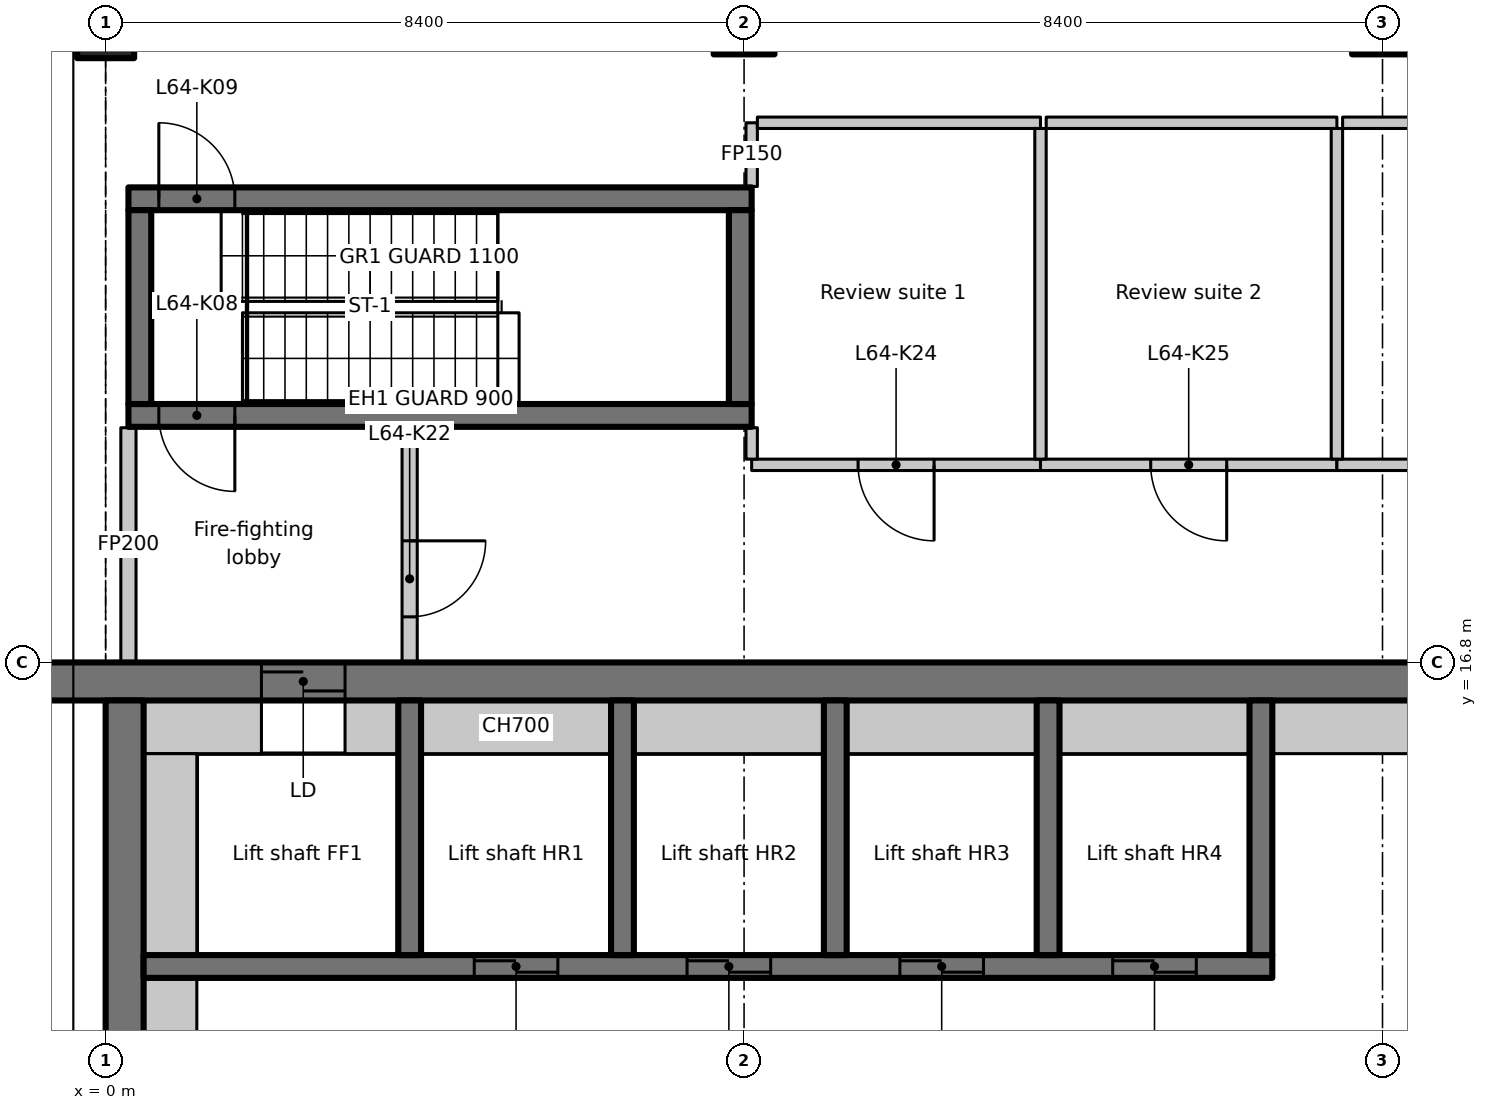
"""IFC4 building model, lengths in metres.
Left out: names, types, materials, properties, quantities, classifications, styles, units other than length and angle.
Written with IfcOpenShell. Run it as: python <this file> out.ifc"""

import sys

from ifc_helpers import new_model, si_unit, direction, frame, frame_2d, origin, origin_2d, place, context, subcontext, project, spatial, rectangle, extrude, element, fill, save


model = new_model("IFC4")
c1 = context("Model", 3, precision=1e-05, world=origin(), true_north=direction((0.0, 1.0)))
c2 = subcontext(c1, "Body", "Model", "MODEL_VIEW")
j1 = project(units=[si_unit("LENGTHUNIT", "METRE"), si_unit("PLANEANGLEUNIT", "RADIAN")], contexts=[c1])
p1 = place(None, origin())
s1 = spatial("IfcSite", under=j1, at=p1, CompositionType="ELEMENT")
p2 = place(p1, origin())
s2 = spatial("IfcBuilding", under=s1, at=p2, CompositionType="ELEMENT")
p3 = place(p2, frame((0.0, 0.0, 251.7)))
s3 = spatial("IfcBuildingStorey", under=s2, at=p3, CompositionType="ELEMENT", Elevation=251.7)
p4 = place(p3, frame((0.0, 25.2, 0.0), z_axis=(0.0, 0.0, 1.0), x_axis=(1.0, 0.0, 0.0)))
e1 = element("IfcColumn", 1, at=p4, inside=s3, PredefinedType="COLUMN", context=c2, shape_type="SweptSolid", body=[
    extrude(rectangle(XDim=0.75, YDim=0.9, at=origin_2d()), origin(), (0.0, 0.0, 1.0), 4.05),
])
for number, where, z_axis, x_axis in (
    (2, (8.4, 25.2, 0.0), (0.0, 0.0, 1.0), (1.0, 0.0, 0.0)),
    (3, (16.8, 25.2, 0.0), (0.0, 0.0, 1.0), (1.0, 0.0, 0.0)),
):
    element("IfcColumn", number, at=place(p3, frame(where, z_axis=z_axis, x_axis=x_axis)), inside=s3, PredefinedType="COLUMN", context=c2, shape_type="SweptSolid", body=[
        extrude(rectangle(XDim=0.8, YDim=0.8, at=origin_2d()), origin(), (0.0, 0.0, 1.0), 4.05),
    ])
p5 = place(p3, frame((-1.1, 16.55, 0.0), z_axis=(0.0, 0.0, 1.0), x_axis=(1.0, 0.0, 0.0)))
e4 = element("IfcWall", 4, at=p5, inside=s3, PredefinedType="SHEAR", context=c2, shape_type="SweptSolid", body=[
    extrude(rectangle(XDim=22.1, YDim=0.5, at=frame_2d((11.05, 0.0))), origin(), (0.0, 0.0, 1.0), 4.05),
])
p6 = place(p5, frame((3.15, 0.0, 0.0)))
e5 = element("IfcOpeningElement", 5, at=p6, cuts=e4, PredefinedType="OPENING", context=c2, shape_type="SweptSolid", body=[
    extrude(rectangle(XDim=1.1, YDim=2.3, at=frame_2d((0.55, 1.15))), frame((0.0, 0.26, 0.0), z_axis=(0.0, -1.0, 0.0), x_axis=(1.0, 0.0, 0.0)), (0.0, 0.0, 1.0), 0.52),
])
p7 = place(p3, frame((0.25, 7.436, 0.0), z_axis=(0.0, 0.0, 1.0), x_axis=(0.0, 1.0, 0.0)))
e6 = element("IfcWall", 6, at=p7, inside=s3, PredefinedType="SHEAR", context=c2, shape_type="SweptSolid", body=[
    extrude(rectangle(XDim=8.864, YDim=0.5, at=frame_2d((4.432, 0.0))), origin(), (0.0, 0.0, 1.0), 4.05),
])
p8 = place(p3, frame((0.5, 15.95, 0.0), z_axis=(0.0, 0.0, 1.0), x_axis=(1.0, 0.0, 0.0)))
e7 = element("IfcWall", 7, at=p8, inside=s3, PredefinedType="PARTITIONING", context=c2, shape_type="SweptSolid", body=[
    extrude(rectangle(XDim=1.55, YDim=0.7, at=frame_2d((0.775, 0.0))), origin(), (0.0, 0.0, 1.0), 4.05),
])
p9 = place(p3, frame((0.5, 12.8, 0.0), z_axis=(0.0, 0.0, 1.0), x_axis=(1.0, 0.0, 0.0)))
e8 = element("IfcWall", 8, at=p9, inside=s3, PredefinedType="SHEAR", context=c2, shape_type="SweptSolid", body=[
    extrude(rectangle(XDim=14.85, YDim=0.3, at=frame_2d((7.425, 0.0))), origin(), (0.0, 0.0, 1.0), 4.05),
])
p10 = place(p9, frame((4.35, 0.0, 0.0)))
e9 = element("IfcOpeningElement", 9, at=p10, cuts=e8, PredefinedType="OPENING", context=c2, shape_type="SweptSolid", body=[
    extrude(rectangle(XDim=1.1, YDim=2.3, at=frame_2d((0.55, 1.15))), frame((0.0, 0.16, 0.0), z_axis=(0.0, -1.0, 0.0), x_axis=(1.0, 0.0, 0.0)), (0.0, 0.0, 1.0), 0.32),
])
p11 = place(p9, frame((7.15, 0.0, 0.0)))
e10 = element("IfcOpeningElement", 10, at=p11, cuts=e8, PredefinedType="OPENING", context=c2, shape_type="SweptSolid", body=[
    extrude(rectangle(XDim=1.1, YDim=2.3, at=frame_2d((0.55, 1.15))), frame((0.0, 0.16, 0.0), z_axis=(0.0, -1.0, 0.0), x_axis=(1.0, 0.0, 0.0)), (0.0, 0.0, 1.0), 0.32),
])
p12 = place(p9, frame((9.95, 0.0, 0.0)))
e11 = element("IfcOpeningElement", 11, at=p12, cuts=e8, PredefinedType="OPENING", context=c2, shape_type="SweptSolid", body=[
    extrude(rectangle(XDim=1.1, YDim=2.3, at=frame_2d((0.55, 1.15))), frame((0.0, 0.16, 0.0), z_axis=(0.0, -1.0, 0.0), x_axis=(1.0, 0.0, 0.0)), (0.0, 0.0, 1.0), 0.32),
])
p13 = place(p9, frame((12.75, 0.0, 0.0)))
e12 = element("IfcOpeningElement", 12, at=p13, cuts=e8, PredefinedType="OPENING", context=c2, shape_type="SweptSolid", body=[
    extrude(rectangle(XDim=1.1, YDim=2.3, at=frame_2d((0.55, 1.15))), frame((0.0, 0.16, 0.0), z_axis=(0.0, -1.0, 0.0), x_axis=(1.0, 0.0, 0.0)), (0.0, 0.0, 1.0), 0.32),
])
for number, where, z_axis, x_axis in (
    (13, (4.0, 12.95, 0.0), (0.0, 0.0, 1.0), (0.0, 1.0, 0.0)),
    (14, (6.8, 12.95, 0.0), (0.0, 0.0, 1.0), (0.0, 1.0, 0.0)),
    (15, (9.6, 12.95, 0.0), (0.0, 0.0, 1.0), (0.0, 1.0, 0.0)),
    (16, (12.4, 12.95, 0.0), (0.0, 0.0, 1.0), (0.0, 1.0, 0.0)),
    (17, (15.2, 12.95, 0.0), (0.0, 0.0, 1.0), (0.0, 1.0, 0.0)),
):
    element("IfcWall", number, at=place(p3, frame(where, z_axis=z_axis, x_axis=x_axis)), inside=s3, PredefinedType="SHEAR", context=c2, shape_type="SweptSolid", body=[
        extrude(rectangle(XDim=3.35, YDim=0.3, at=frame_2d((1.675, 0.0))), origin(), (0.0, 0.0, 1.0), 4.05),
    ])
p14 = place(p3, frame((8.5, 20.05, 0.0), z_axis=(0.0, 0.0, 1.0), x_axis=(-1.0, 0.0, 0.0)))
e18 = element("IfcWall", 18, at=p14, inside=s3, PredefinedType="SHEAR", context=c2, shape_type="SweptSolid", body=[
    extrude(rectangle(XDim=8.2, YDim=0.3, at=frame_2d((4.1, 0.0))), origin(), (0.0, 0.0, 1.0), 4.05),
])
p15 = place(p14, frame((6.8, 0.0, 0.0)))
e19 = element("IfcOpeningElement", 19, at=p15, cuts=e18, PredefinedType="OPENING", context=c2, shape_type="SweptSolid", body=[
    extrude(rectangle(XDim=1.0, YDim=2.1, at=frame_2d((0.5, 1.05))), frame((0.0, 0.16, 0.0), z_axis=(0.0, -1.0, 0.0), x_axis=(1.0, 0.0, 0.0)), (0.0, 0.0, 1.0), 0.32),
])
p16 = place(p3, frame((0.3, 22.9, 0.0), z_axis=(0.0, 0.0, 1.0), x_axis=(1.0, 0.0, 0.0)))
e20 = element("IfcWall", 20, at=p16, inside=s3, PredefinedType="SHEAR", context=c2, shape_type="SweptSolid", body=[
    extrude(rectangle(XDim=8.2, YDim=0.3, at=frame_2d((4.1, 0.0))), origin(), (0.0, 0.0, 1.0), 4.05),
])
p17 = place(p16, frame((0.4, 0.0, 0.0)))
e21 = element("IfcOpeningElement", 21, at=p17, cuts=e20, PredefinedType="OPENING", context=c2, shape_type="SweptSolid", body=[
    extrude(rectangle(XDim=1.0, YDim=2.1, at=frame_2d((0.5, 1.05))), frame((0.0, 0.16, 0.0), z_axis=(0.0, -1.0, 0.0), x_axis=(1.0, 0.0, 0.0)), (0.0, 0.0, 1.0), 0.32),
])
for number, where, z_axis, x_axis in (
    (22, (0.45, 20.2, 0.0), (0.0, 0.0, 1.0), (0.0, 1.0, 0.0)),
    (23, (8.35, 20.2, 0.0), (0.0, 0.0, 1.0), (0.0, 1.0, 0.0)),
):
    element("IfcWall", number, at=place(p3, frame(where, z_axis=z_axis, x_axis=x_axis)), inside=s3, PredefinedType="SHEAR", context=c2, shape_type="SweptSolid", body=[
        extrude(rectangle(XDim=2.55, YDim=0.3, at=frame_2d((1.275, 0.0))), origin(), (0.0, 0.0, 1.0), 4.05),
    ])
p18 = place(p3, frame((0.3, 16.812, 0.0), z_axis=(0.0, 0.0, 1.0), x_axis=(0.0, 1.0, 0.0)))
e24 = element("IfcWall", 24, at=p18, inside=s3, PredefinedType="PARTITIONING", context=c2, shape_type="SweptSolid", body=[
    extrude(rectangle(XDim=3.076, YDim=0.2, at=frame_2d((1.538, 0.0))), origin(), (0.0, 0.0, 1.0), 3.68),
])
p19 = place(p3, frame((4.0, 19.888, 0.0), z_axis=(0.0, 0.0, 1.0), x_axis=(0.0, -1.0, 0.0)))
e25 = element("IfcWall", 25, at=p19, inside=s3, PredefinedType="PARTITIONING", context=c2, shape_type="SweptSolid", body=[
    extrude(rectangle(XDim=3.076, YDim=0.2, at=frame_2d((1.538, 0.0))), origin(), (0.0, 0.0, 1.0), 4.05),
])
p20 = place(p19, frame((1.488, 0.0, 0.0)))
e26 = element("IfcOpeningElement", 26, at=p20, cuts=e25, PredefinedType="OPENING", context=c2, shape_type="SweptSolid", body=[
    extrude(rectangle(XDim=1.0, YDim=2.1, at=frame_2d((0.5, 1.05))), frame((0.0, 0.11, 0.0), z_axis=(0.0, -1.0, 0.0), x_axis=(1.0, 0.0, 0.0)), (0.0, 0.0, 1.0), 0.22),
])
p21 = place(p3, frame((12.3, 19.4, 0.0), z_axis=(0.0, 0.0, 1.0), x_axis=(-1.0, 0.0, 0.0)))
e27 = element("IfcWall", 27, at=p21, inside=s3, PredefinedType="PARTITIONING", context=c2, shape_type="SweptSolid", body=[
    extrude(rectangle(XDim=3.8, YDim=0.15, at=frame_2d((1.9, 0.0))), origin(), (0.0, 0.0, 1.0), 4.05),
])
p22 = place(p21, frame((1.4, 0.0, 0.0)))
e28 = element("IfcOpeningElement", 28, at=p22, cuts=e27, PredefinedType="OPENING", context=c2, shape_type="SweptSolid", body=[
    extrude(rectangle(XDim=1.0, YDim=2.1, at=frame_2d((0.5, 1.05))), frame((0.0, 0.085, 0.0), z_axis=(0.0, -1.0, 0.0), x_axis=(1.0, 0.0, 0.0)), (0.0, 0.0, 1.0), 0.17),
])
p23 = place(p3, frame((8.5, 19.475, 0.0), z_axis=(0.0, 0.0, 1.0), x_axis=(0.0, 1.0, 0.0)))
e29 = element("IfcWall", 29, at=p23, inside=s3, PredefinedType="PARTITIONING", context=c2, shape_type="SweptSolid", body=[
    extrude(rectangle(XDim=0.413, YDim=0.15, at=frame_2d((0.207, 0.0))), origin(), (0.0, 0.0, 1.0), 4.05),
])
p24 = place(p3, frame((8.5, 23.062, 0.0), z_axis=(0.0, 0.0, 1.0), x_axis=(0.0, 1.0, 0.0)))
e30 = element("IfcWall", 30, at=p24, inside=s3, PredefinedType="PARTITIONING", context=c2, shape_type="SweptSolid", body=[
    extrude(rectangle(XDim=0.838, YDim=0.15, at=frame_2d((0.419, 0.0))), origin(), (0.0, 0.0, 1.0), 4.05),
])
p25 = place(p3, frame((8.575, 23.9, 0.0), z_axis=(0.0, 0.0, 1.0), x_axis=(1.0, 0.0, 0.0)))
e31 = element("IfcWall", 31, at=p25, inside=s3, PredefinedType="PARTITIONING", context=c2, shape_type="SweptSolid", body=[
    extrude(rectangle(XDim=3.725, YDim=0.15, at=frame_2d((1.863, 0.0))), origin(), (0.0, 0.0, 1.0), 4.05),
])
p26 = place(p3, frame((16.2, 19.4, 0.0), z_axis=(0.0, 0.0, 1.0), x_axis=(-1.0, 0.0, 0.0)))
e32 = element("IfcWall", 32, at=p26, inside=s3, PredefinedType="PARTITIONING", context=c2, shape_type="SweptSolid", body=[
    extrude(rectangle(XDim=3.9, YDim=0.15, at=frame_2d((1.95, 0.0))), origin(), (0.0, 0.0, 1.0), 4.05),
])
p27 = place(p26, frame((1.45, 0.0, 0.0)))
e33 = element("IfcOpeningElement", 33, at=p27, cuts=e32, PredefinedType="OPENING", context=c2, shape_type="SweptSolid", body=[
    extrude(rectangle(XDim=1.0, YDim=2.1, at=frame_2d((0.5, 1.05))), frame((0.0, 0.085, 0.0), z_axis=(0.0, -1.0, 0.0), x_axis=(1.0, 0.0, 0.0)), (0.0, 0.0, 1.0), 0.17),
])
p28 = place(p3, frame((12.3, 23.825, 0.0), z_axis=(0.0, 0.0, 1.0), x_axis=(0.0, -1.0, 0.0)))
e34 = element("IfcWall", 34, at=p28, inside=s3, PredefinedType="PARTITIONING", context=c2, shape_type="SweptSolid", body=[
    extrude(rectangle(XDim=4.35, YDim=0.15, at=frame_2d((2.175, 0.0))), origin(), (0.0, 0.0, 1.0), 4.05),
])
p29 = place(p3, frame((12.375, 23.9, 0.0), z_axis=(0.0, 0.0, 1.0), x_axis=(1.0, 0.0, 0.0)))
e35 = element("IfcWall", 35, at=p29, inside=s3, PredefinedType="PARTITIONING", context=c2, shape_type="SweptSolid", body=[
    extrude(rectangle(XDim=3.825, YDim=0.15, at=frame_2d((1.913, 0.0))), origin(), (0.0, 0.0, 1.0), 4.05),
])
p30 = place(p3, frame((19.925, 19.4, 0.0), z_axis=(0.0, 0.0, 1.0), x_axis=(-1.0, 0.0, 0.0)))
e36 = element("IfcWall", 36, at=p30, inside=s3, PredefinedType="PARTITIONING", context=c2, shape_type="SweptSolid", body=[
    extrude(rectangle(XDim=3.725, YDim=0.15, at=frame_2d((1.863, 0.0))), origin(), (0.0, 0.0, 1.0), 4.05),
])
p31 = place(p30, frame((1.325, 0.0, 0.0)))
e37 = element("IfcOpeningElement", 37, at=p31, cuts=e36, PredefinedType="OPENING", context=c2, shape_type="SweptSolid", body=[
    extrude(rectangle(XDim=1.0, YDim=2.1, at=frame_2d((0.5, 1.05))), frame((0.0, 0.085, 0.0), z_axis=(0.0, -1.0, 0.0), x_axis=(1.0, 0.0, 0.0)), (0.0, 0.0, 1.0), 0.17),
])
p32 = place(p3, frame((16.2, 23.825, 0.0), z_axis=(0.0, 0.0, 1.0), x_axis=(0.0, -1.0, 0.0)))
e38 = element("IfcWall", 38, at=p32, inside=s3, PredefinedType="PARTITIONING", context=c2, shape_type="SweptSolid", body=[
    extrude(rectangle(XDim=4.35, YDim=0.15, at=frame_2d((2.175, 0.0))), origin(), (0.0, 0.0, 1.0), 4.05),
])
p33 = place(p3, frame((16.275, 23.9, 0.0), z_axis=(0.0, 0.0, 1.0), x_axis=(1.0, 0.0, 0.0)))
e39 = element("IfcWall", 39, at=p33, inside=s3, PredefinedType="PARTITIONING", context=c2, shape_type="SweptSolid", body=[
    extrude(rectangle(XDim=3.725, YDim=0.15, at=frame_2d((1.863, 0.0))), origin(), (0.0, 0.0, 1.0), 4.05),
])
p34 = place(p3, frame((0.85, 7.436, 0.0), z_axis=(0.0, 0.0, 1.0), x_axis=(0.0, 1.0, 0.0)))
e40 = element("IfcWall", 40, at=p34, inside=s3, PredefinedType="PARTITIONING", context=c2, shape_type="SweptSolid", body=[
    extrude(rectangle(XDim=5.214, YDim=0.7, at=frame_2d((2.607, 0.0))), origin(), (0.0, 0.0, 1.0), 4.05),
])
p35 = place(p3, frame((0.85, 12.95, 0.0), z_axis=(0.0, 0.0, 1.0), x_axis=(0.0, 1.0, 0.0)))
e41 = element("IfcWall", 41, at=p35, inside=s3, PredefinedType="PARTITIONING", context=c2, shape_type="SweptSolid", body=[
    extrude(rectangle(XDim=2.65, YDim=0.7, at=frame_2d((1.325, 0.0))), origin(), (0.0, 0.0, 1.0), 4.05),
])
p36 = place(p3, frame((3.15, 15.95, 0.0), z_axis=(0.0, 0.0, 1.0), x_axis=(1.0, 0.0, 0.0)))
e42 = element("IfcWall", 42, at=p36, inside=s3, PredefinedType="PARTITIONING", context=c2, shape_type="SweptSolid", body=[
    extrude(rectangle(XDim=0.7, YDim=0.7, at=frame_2d((0.35, 0.0))), origin(), (0.0, 0.0, 1.0), 4.05),
])
for number, where, z_axis, x_axis in (
    (43, (4.15, 15.95, 0.0), (0.0, 0.0, 1.0), (1.0, 0.0, 0.0)),
    (44, (6.95, 15.95, 0.0), (0.0, 0.0, 1.0), (1.0, 0.0, 0.0)),
    (45, (9.75, 15.95, 0.0), (0.0, 0.0, 1.0), (1.0, 0.0, 0.0)),
    (46, (12.55, 15.95, 0.0), (0.0, 0.0, 1.0), (1.0, 0.0, 0.0)),
    (47, (15.35, 15.95, 0.0), (0.0, 0.0, 1.0), (1.0, 0.0, 0.0)),
):
    element("IfcWall", number, at=place(p3, frame(where, z_axis=z_axis, x_axis=x_axis)), inside=s3, PredefinedType="PARTITIONING", context=c2, shape_type="SweptSolid", body=[
        extrude(rectangle(XDim=2.5, YDim=0.7, at=frame_2d((1.25, 0.0))), origin(), (0.0, 0.0, 1.0), 4.05),
    ])
p37 = place(p6, origin())
e48 = element("IfcDoor", 48, at=p37, inside=s3, OperationType="SLIDING_TO_LEFT", PredefinedType="DOOR", context=c2, shape_type="SweptSolid", body=[
    extrude(rectangle(XDim=1.1, YDim=2.3, at=frame_2d((0.55, 1.15))), frame((0.0, 0.025, 0.0), z_axis=(0.0, -1.0, 0.0), x_axis=(1.0, 0.0, 0.0)), (0.0, 0.0, 1.0), 0.05),
])
fill(e5, e48)
p38 = place(p10, origin())
e49 = element("IfcDoor", 49, at=p38, inside=s3, OperationType="SLIDING_TO_LEFT", PredefinedType="DOOR", context=c2, shape_type="SweptSolid", body=[
    extrude(rectangle(XDim=1.1, YDim=2.3, at=frame_2d((0.55, 1.15))), frame((0.0, 0.025, 0.0), z_axis=(0.0, -1.0, 0.0), x_axis=(1.0, 0.0, 0.0)), (0.0, 0.0, 1.0), 0.05),
])
fill(e9, e49)
p39 = place(p11, origin())
e50 = element("IfcDoor", 50, at=p39, inside=s3, OperationType="SLIDING_TO_LEFT", PredefinedType="DOOR", context=c2, shape_type="SweptSolid", body=[
    extrude(rectangle(XDim=1.1, YDim=2.3, at=frame_2d((0.55, 1.15))), frame((0.0, 0.025, 0.0), z_axis=(0.0, -1.0, 0.0), x_axis=(1.0, 0.0, 0.0)), (0.0, 0.0, 1.0), 0.05),
])
fill(e10, e50)
p40 = place(p12, origin())
e51 = element("IfcDoor", 51, at=p40, inside=s3, OperationType="SLIDING_TO_LEFT", PredefinedType="DOOR", context=c2, shape_type="SweptSolid", body=[
    extrude(rectangle(XDim=1.1, YDim=2.3, at=frame_2d((0.55, 1.15))), frame((0.0, 0.025, 0.0), z_axis=(0.0, -1.0, 0.0), x_axis=(1.0, 0.0, 0.0)), (0.0, 0.0, 1.0), 0.05),
])
fill(e11, e51)
p41 = place(p13, origin())
e52 = element("IfcDoor", 52, at=p41, inside=s3, OperationType="SLIDING_TO_LEFT", PredefinedType="DOOR", context=c2, shape_type="SweptSolid", body=[
    extrude(rectangle(XDim=1.1, YDim=2.3, at=frame_2d((0.55, 1.15))), frame((0.0, 0.025, 0.0), z_axis=(0.0, -1.0, 0.0), x_axis=(1.0, 0.0, 0.0)), (0.0, 0.0, 1.0), 0.05),
])
fill(e12, e52)
p42 = place(p15, origin())
e53 = element("IfcDoor", 53, at=p42, inside=s3, OperationType="SINGLE_SWING_RIGHT", PredefinedType="DOOR", context=c2, shape_type="SweptSolid", body=[
    extrude(rectangle(XDim=1.0, YDim=2.1, at=frame_2d((0.5, 1.05))), frame((0.0, 0.025, 0.0), z_axis=(0.0, -1.0, 0.0), x_axis=(1.0, 0.0, 0.0)), (0.0, 0.0, 1.0), 0.05),
])
fill(e19, e53)
p43 = place(p17, origin())
e54 = element("IfcDoor", 54, at=p43, inside=s3, OperationType="SINGLE_SWING_LEFT", PredefinedType="DOOR", context=c2, shape_type="SweptSolid", body=[
    extrude(rectangle(XDim=1.0, YDim=2.1, at=frame_2d((0.5, 1.05))), frame((0.0, 0.025, 0.0), z_axis=(0.0, -1.0, 0.0), x_axis=(1.0, 0.0, 0.0)), (0.0, 0.0, 1.0), 0.05),
])
fill(e21, e54)
p44 = place(p20, origin())
e55 = element("IfcDoor", 55, at=p44, inside=s3, OperationType="SINGLE_SWING_RIGHT", PredefinedType="DOOR", context=c2, shape_type="SweptSolid", body=[
    extrude(rectangle(XDim=1.0, YDim=2.1, at=frame_2d((0.5, 1.05))), frame((0.0, 0.025, 0.0), z_axis=(0.0, -1.0, 0.0), x_axis=(1.0, 0.0, 0.0)), (0.0, 0.0, 1.0), 0.05),
])
fill(e26, e55)
p45 = place(p22, origin())
e56 = element("IfcDoor", 56, at=p45, inside=s3, OperationType="SINGLE_SWING_RIGHT", PredefinedType="DOOR", context=c2, shape_type="SweptSolid", body=[
    extrude(rectangle(XDim=1.0, YDim=2.1, at=frame_2d((0.5, 1.05))), frame((0.0, 0.025, 0.0), z_axis=(0.0, -1.0, 0.0), x_axis=(1.0, 0.0, 0.0)), (0.0, 0.0, 1.0), 0.05),
])
fill(e28, e56)
p46 = place(p27, origin())
e57 = element("IfcDoor", 57, at=p46, inside=s3, OperationType="SINGLE_SWING_LEFT", PredefinedType="DOOR", context=c2, shape_type="SweptSolid", body=[
    extrude(rectangle(XDim=1.0, YDim=2.1, at=frame_2d((0.5, 1.05))), frame((0.0, 0.025, 0.0), z_axis=(0.0, -1.0, 0.0), x_axis=(1.0, 0.0, 0.0)), (0.0, 0.0, 1.0), 0.05),
])
fill(e33, e57)
save(model, sys.argv[1])
